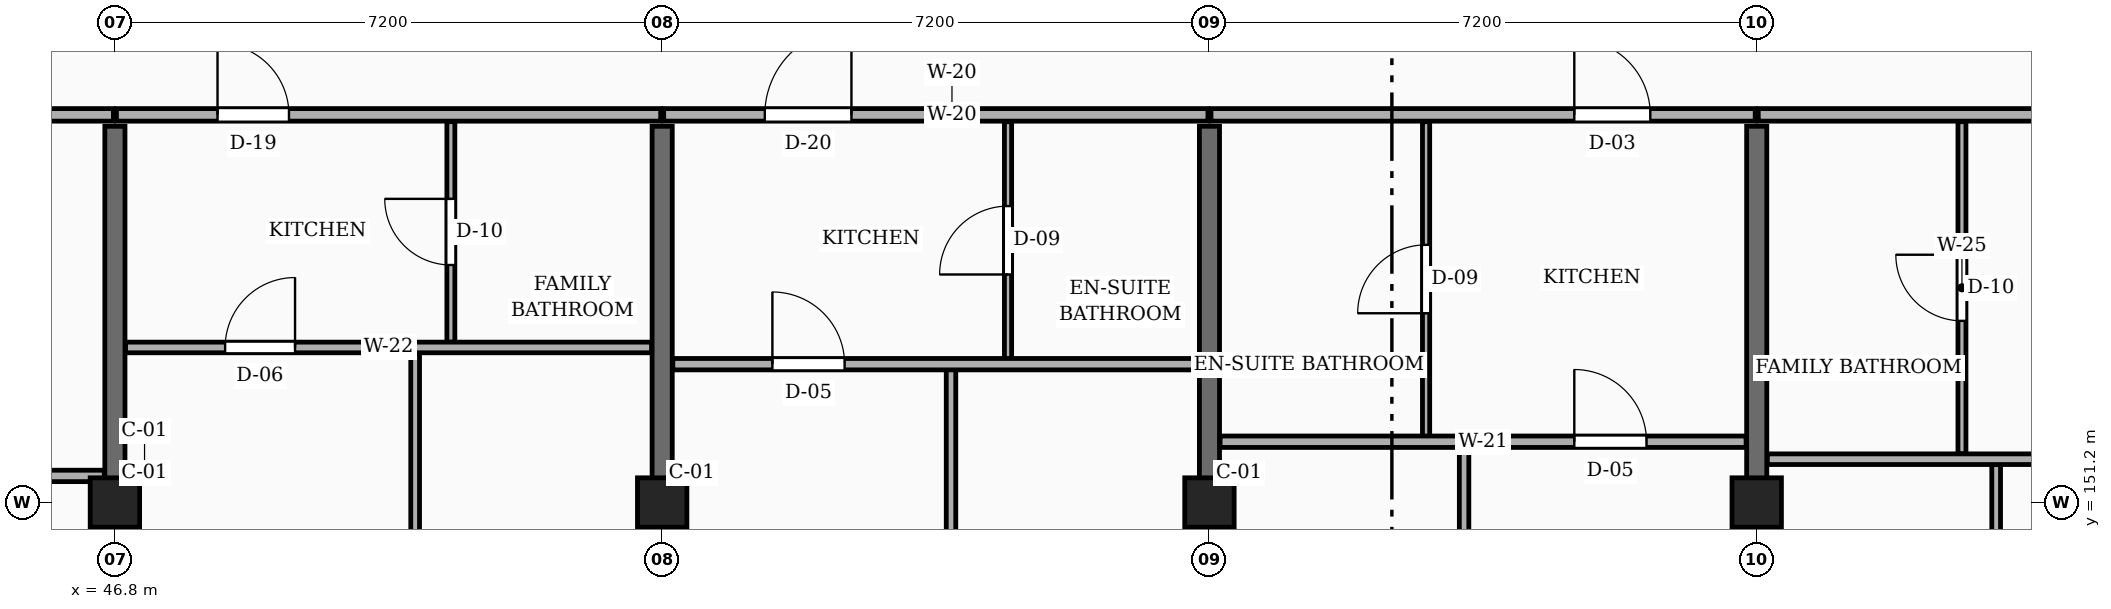
"""IFC4 building model, lengths in metres.
Left out: names, types, materials, properties, quantities, classifications, styles, units other than length and angle.
Written with IfcOpenShell. Run it as: python <this file> out.ifc"""

import sys

from ifc_helpers import new_model, si_unit, direction, frame, frame_2d, origin, origin_2d, place, context, subcontext, project, spatial, rectangle, extrude, element, fill, save


model = new_model("IFC4")
c1 = context("Model", 3, precision=1e-05, world=origin(), true_north=direction((0.0, 1.0)))
c2 = subcontext(c1, "Body", "Model", "MODEL_VIEW")
j1 = project(units=[si_unit("LENGTHUNIT", "METRE"), si_unit("PLANEANGLEUNIT", "RADIAN")], contexts=[c1])
p1 = place(None, origin())
s1 = spatial("IfcSite", under=j1, at=p1, CompositionType="ELEMENT")
p2 = place(p1, origin())
s2 = spatial("IfcBuilding", under=s1, at=p2, CompositionType="ELEMENT")
p3 = place(p2, frame((0.0, 0.0, 4.5)))
s3 = spatial("IfcBuildingStorey", under=s2, at=p3, CompositionType="ELEMENT", Elevation=4.5)
for number, where, z_axis, x_axis in (
    (1, (46.8, 151.2, 0.0), (0.0, 0.0, 1.0), (1.0, 0.0, 0.0)),
    (2, (54.0, 151.2, 0.0), (0.0, 0.0, 1.0), (1.0, 0.0, 0.0)),
    (3, (61.2, 151.2, 0.0), (0.0, 0.0, 1.0), (1.0, 0.0, 0.0)),
    (4, (68.4, 151.2, 0.0), (0.0, 0.0, 1.0), (1.0, 0.0, 0.0)),
):
    element("IfcColumn", number, at=place(p3, frame(where, z_axis=z_axis, x_axis=x_axis)), inside=s3, PredefinedType="COLUMN", context=c2, shape_type="SweptSolid", body=[
        extrude(rectangle(XDim=0.65, YDim=0.65, at=origin_2d()), origin(), (0.0, 0.0, 1.0), 3.15),
    ])
for number, where, z_axis, x_axis in (
    (5, (46.8, 144.3, 0.0), (0.0, 0.0, 1.0), (0.0, 1.0, 0.0)),
    (6, (54.0, 144.3, 0.0), (0.0, 0.0, 1.0), (0.0, 1.0, 0.0)),
    (7, (61.2, 144.3, 0.0), (0.0, 0.0, 1.0), (0.0, 1.0, 0.0)),
    (8, (68.4, 144.3, 0.0), (0.0, 0.0, 1.0), (0.0, 1.0, 0.0)),
):
    element("IfcWall", number, at=place(p3, frame(where, z_axis=z_axis, x_axis=x_axis)), inside=s3, PredefinedType="SOLIDWALL", context=c2, shape_type="SweptSolid", body=[
        extrude(rectangle(XDim=11.85, YDim=0.265, at=frame_2d((5.925, 0.0))), origin(), (0.0, 0.0, 1.0), 2.185),
    ])
p4 = place(p3, frame((39.62, 156.3, 0.0), z_axis=(0.0, 0.0, 1.0), x_axis=(1.0, 0.0, 0.0)))
e9 = element("IfcWall", 9, at=p4, inside=s3, PredefinedType="PARTITIONING", context=c2, shape_type="SweptSolid", body=[
    extrude(rectangle(XDim=7.16, YDim=0.165, at=frame_2d((3.58, 0.0))), origin(), (0.0, 0.0, 1.0), 2.32),
])
p5 = place(p4, frame((4.78, 0.0, 0.0)))
e10 = element("IfcOpeningElement", 10, at=p5, cuts=e9, PredefinedType="OPENING", context=c2, shape_type="SweptSolid", body=[
    extrude(rectangle(XDim=1.0, YDim=2.15, at=frame_2d((0.5, 1.075))), frame((0.0, 0.093, 0.0), z_axis=(0.0, -1.0, 0.0), x_axis=(1.0, 0.0, 0.0)), (0.0, 0.0, 1.0), 0.185),
])
p6 = place(p3, frame((46.82, 156.3, 0.0), z_axis=(0.0, 0.0, 1.0), x_axis=(1.0, 0.0, 0.0)))
e11 = element("IfcWall", 11, at=p6, inside=s3, PredefinedType="PARTITIONING", context=c2, shape_type="SweptSolid", body=[
    extrude(rectangle(XDim=7.16, YDim=0.165, at=frame_2d((3.58, 0.0))), origin(), (0.0, 0.0, 1.0), 2.32),
])
p7 = place(p6, frame((1.33, 0.0, 0.0)))
e12 = element("IfcOpeningElement", 12, at=p7, cuts=e11, PredefinedType="OPENING", context=c2, shape_type="SweptSolid", body=[
    extrude(rectangle(XDim=0.94, YDim=2.12, at=frame_2d((0.47, 1.06))), frame((0.0, 0.093, 0.0), z_axis=(0.0, -1.0, 0.0), x_axis=(1.0, 0.0, 0.0)), (0.0, 0.0, 1.0), 0.185),
])
p8 = place(p3, frame((54.02, 156.3, 0.0), z_axis=(0.0, 0.0, 1.0), x_axis=(1.0, 0.0, 0.0)))
e13 = element("IfcWall", 13, at=p8, inside=s3, PredefinedType="PARTITIONING", context=c2, shape_type="SweptSolid", body=[
    extrude(rectangle(XDim=7.16, YDim=0.165, at=frame_2d((3.58, 0.0))), origin(), (0.0, 0.0, 1.0), 2.32),
])
p9 = place(p8, frame((1.33, 0.0, 0.0)))
e14 = element("IfcOpeningElement", 14, at=p9, cuts=e13, PredefinedType="OPENING", context=c2, shape_type="SweptSolid", body=[
    extrude(rectangle(XDim=1.14, YDim=2.18, at=frame_2d((0.57, 1.09))), frame((0.0, 0.093, 0.0), z_axis=(0.0, -1.0, 0.0), x_axis=(1.0, 0.0, 0.0)), (0.0, 0.0, 1.0), 0.185),
])
p10 = place(p3, frame((61.22, 156.3, 0.0), z_axis=(0.0, 0.0, 1.0), x_axis=(1.0, 0.0, 0.0)))
e15 = element("IfcWall", 15, at=p10, inside=s3, PredefinedType="PARTITIONING", context=c2, shape_type="SweptSolid", body=[
    extrude(rectangle(XDim=7.16, YDim=0.165, at=frame_2d((3.58, 0.0))), origin(), (0.0, 0.0, 1.0), 2.32),
])
p11 = place(p10, frame((4.78, 0.0, 0.0)))
e16 = element("IfcOpeningElement", 16, at=p11, cuts=e15, PredefinedType="OPENING", context=c2, shape_type="SweptSolid", body=[
    extrude(rectangle(XDim=1.0, YDim=2.15, at=frame_2d((0.5, 1.075))), frame((0.0, 0.093, 0.0), z_axis=(0.0, -1.0, 0.0), x_axis=(1.0, 0.0, 0.0)), (0.0, 0.0, 1.0), 0.185),
])
p12 = place(p3, frame((68.42, 156.3, 0.0), z_axis=(0.0, 0.0, 1.0), x_axis=(1.0, 0.0, 0.0)))
e17 = element("IfcWall", 17, at=p12, inside=s3, PredefinedType="PARTITIONING", context=c2, shape_type="SweptSolid", body=[
    extrude(rectangle(XDim=7.005, YDim=0.165, at=frame_2d((3.502, 0.0))), origin(), (0.0, 0.0, 1.0), 2.32),
])
p13 = place(p12, frame((4.78, 0.0, 0.0)))
e18 = element("IfcOpeningElement", 18, at=p13, cuts=e17, PredefinedType="OPENING", context=c2, shape_type="SweptSolid", body=[
    extrude(rectangle(XDim=0.94, YDim=2.12, at=frame_2d((0.47, 1.06))), frame((0.0, 0.093, 0.0), z_axis=(0.0, -1.0, 0.0), x_axis=(1.0, 0.0, 0.0)), (0.0, 0.0, 1.0), 0.185),
])
p14 = place(p3, frame((39.74, 151.55, 0.0), z_axis=(0.0, 0.0, 1.0), x_axis=(1.0, 0.0, 0.0)))
e19 = element("IfcWall", 19, at=p14, inside=s3, PredefinedType="PARTITIONING", context=c2, shape_type="SweptSolid", body=[
    extrude(rectangle(XDim=6.92, YDim=0.15, at=frame_2d((3.46, 0.0))), origin(), (0.0, 0.0, 1.0), 2.32),
])
p15 = place(p14, frame((4.66, 0.0, 0.0)))
e20 = element("IfcOpeningElement", 20, at=p15, cuts=e19, PredefinedType="OPENING", context=c2, shape_type="SweptSolid", body=[
    extrude(rectangle(XDim=0.95, YDim=2.1, at=frame_2d((0.475, 1.05))), frame((0.0, 0.085, 0.0), z_axis=(0.0, -1.0, 0.0), x_axis=(1.0, 0.0, 0.0)), (0.0, 0.0, 1.0), 0.17),
])
p16 = place(p3, frame((50.75, 144.175, 0.0), z_axis=(0.0, 0.0, 1.0), x_axis=(0.0, 1.0, 0.0)))
e21 = element("IfcWall", 21, at=p16, inside=s3, PredefinedType="PARTITIONING", context=c2, shape_type="SweptSolid", body=[
    extrude(rectangle(XDim=8.995, YDim=0.115, at=frame_2d((4.498, 0.0))), origin(), (0.0, 0.0, 1.0), 2.32),
])
p17 = place(p16, frame((4.058, 0.0, 0.0)))
e22 = element("IfcOpeningElement", 22, at=p17, cuts=e21, PredefinedType="OPENING", context=c2, shape_type="SweptSolid", body=[
    extrude(rectangle(XDim=0.88, YDim=2.08, at=frame_2d((0.44, 1.04))), frame((0.0, 0.067, 0.0), z_axis=(0.0, -1.0, 0.0), x_axis=(1.0, 0.0, 0.0)), (0.0, 0.0, 1.0), 0.135),
])
p18 = place(p3, frame((51.22, 153.31, 0.0), z_axis=(0.0, 0.0, 1.0), x_axis=(0.0, 1.0, 0.0)))
e23 = element("IfcWall", 23, at=p18, inside=s3, PredefinedType="PARTITIONING", context=c2, shape_type="SweptSolid", body=[
    extrude(rectangle(XDim=2.9, YDim=0.105, at=frame_2d((1.45, 0.0))), origin(), (0.0, 0.0, 1.0), 2.32),
])
p19 = place(p18, frame((1.015, 0.0, 0.0)))
e24 = element("IfcOpeningElement", 24, at=p19, cuts=e23, PredefinedType="OPENING", context=c2, shape_type="SweptSolid", body=[
    extrude(rectangle(XDim=0.87, YDim=2.05, at=frame_2d((0.435, 1.025))), frame((0.0, 0.062, 0.0), z_axis=(0.0, -1.0, 0.0), x_axis=(1.0, 0.0, 0.0)), (0.0, 0.0, 1.0), 0.125),
])
p20 = place(p3, frame((46.94, 153.24, 0.0), z_axis=(0.0, 0.0, 1.0), x_axis=(1.0, 0.0, 0.0)))
e25 = element("IfcWall", 25, at=p20, inside=s3, PredefinedType="PARTITIONING", context=c2, shape_type="SweptSolid", body=[
    extrude(rectangle(XDim=6.92, YDim=0.14, at=frame_2d((3.46, 0.0))), origin(), (0.0, 0.0, 1.0), 2.32),
])
p21 = place(p20, frame((1.31, 0.0, 0.0)))
e26 = element("IfcOpeningElement", 26, at=p21, cuts=e25, PredefinedType="OPENING", context=c2, shape_type="SweptSolid", body=[
    extrude(rectangle(XDim=0.92, YDim=2.1, at=frame_2d((0.46, 1.05))), frame((0.0, 0.08, 0.0), z_axis=(0.0, -1.0, 0.0), x_axis=(1.0, 0.0, 0.0)), (0.0, 0.0, 1.0), 0.16),
])
p22 = place(p3, frame((57.8, 144.175, 0.0), z_axis=(0.0, 0.0, 1.0), x_axis=(0.0, 1.0, 0.0)))
e27 = element("IfcWall", 27, at=p22, inside=s3, PredefinedType="PARTITIONING", context=c2, shape_type="SweptSolid", body=[
    extrude(rectangle(XDim=8.775, YDim=0.125, at=frame_2d((4.387, 0.0))), origin(), (0.0, 0.0, 1.0), 2.32),
])
p23 = place(p22, frame((3.938, 0.0, 0.0)))
e28 = element("IfcOpeningElement", 28, at=p23, cuts=e27, PredefinedType="OPENING", context=c2, shape_type="SweptSolid", body=[
    extrude(rectangle(XDim=0.9, YDim=2.1, at=frame_2d((0.45, 1.05))), frame((0.0, 0.073, 0.0), z_axis=(0.0, -1.0, 0.0), x_axis=(1.0, 0.0, 0.0)), (0.0, 0.0, 1.0), 0.145),
])
p24 = place(p3, frame((58.55, 153.09, 0.0), z_axis=(0.0, 0.0, 1.0), x_axis=(0.0, 1.0, 0.0)))
e29 = element("IfcWall", 29, at=p24, inside=s3, PredefinedType="PARTITIONING", context=c2, shape_type="SweptSolid", body=[
    extrude(rectangle(XDim=3.12, YDim=0.095, at=frame_2d((1.56, 0.0))), origin(), (0.0, 0.0, 1.0), 2.32),
])
p25 = place(p24, frame((1.11, 0.0, 0.0)))
e30 = element("IfcOpeningElement", 30, at=p25, cuts=e29, PredefinedType="OPENING", context=c2, shape_type="SweptSolid", body=[
    extrude(rectangle(XDim=0.9, YDim=2.05, at=frame_2d((0.45, 1.025))), frame((0.0, 0.058, 0.0), z_axis=(0.0, -1.0, 0.0), x_axis=(1.0, 0.0, 0.0)), (0.0, 0.0, 1.0), 0.115),
])
p26 = place(p3, frame((54.14, 153.02, 0.0), z_axis=(0.0, 0.0, 1.0), x_axis=(1.0, 0.0, 0.0)))
e31 = element("IfcWall", 31, at=p26, inside=s3, PredefinedType="PARTITIONING", context=c2, shape_type="SweptSolid", body=[
    extrude(rectangle(XDim=6.92, YDim=0.15, at=frame_2d((3.46, 0.0))), origin(), (0.0, 0.0, 1.0), 2.32),
])
p27 = place(p26, frame((1.31, 0.0, 0.0)))
e32 = element("IfcOpeningElement", 32, at=p27, cuts=e31, PredefinedType="OPENING", context=c2, shape_type="SweptSolid", body=[
    extrude(rectangle(XDim=0.95, YDim=2.1, at=frame_2d((0.475, 1.05))), frame((0.0, 0.085, 0.0), z_axis=(0.0, -1.0, 0.0), x_axis=(1.0, 0.0, 0.0)), (0.0, 0.0, 1.0), 0.17),
])
p28 = place(p3, frame((64.55, 144.175, 0.0), z_axis=(0.0, 0.0, 1.0), x_axis=(0.0, 1.0, 0.0)))
e33 = element("IfcWall", 33, at=p28, inside=s3, PredefinedType="PARTITIONING", context=c2, shape_type="SweptSolid", body=[
    extrude(rectangle(XDim=7.755, YDim=0.125, at=frame_2d((3.877, 0.0))), origin(), (0.0, 0.0, 1.0), 2.32),
])
p29 = place(p28, frame((3.427, 0.0, 0.0)))
e34 = element("IfcOpeningElement", 34, at=p29, cuts=e33, PredefinedType="OPENING", context=c2, shape_type="SweptSolid", body=[
    extrude(rectangle(XDim=0.9, YDim=2.1, at=frame_2d((0.45, 1.05))), frame((0.0, 0.073, 0.0), z_axis=(0.0, -1.0, 0.0), x_axis=(1.0, 0.0, 0.0)), (0.0, 0.0, 1.0), 0.145),
])
p30 = place(p3, frame((64.05, 152.07, 0.0), z_axis=(0.0, 0.0, 1.0), x_axis=(0.0, 1.0, 0.0)))
e35 = element("IfcWall", 35, at=p30, inside=s3, PredefinedType="PARTITIONING", context=c2, shape_type="SweptSolid", body=[
    extrude(rectangle(XDim=4.14, YDim=0.095, at=frame_2d((2.07, 0.0))), origin(), (0.0, 0.0, 1.0), 2.32),
])
p31 = place(p30, frame((1.62, 0.0, 0.0)))
e36 = element("IfcOpeningElement", 36, at=p31, cuts=e35, PredefinedType="OPENING", context=c2, shape_type="SweptSolid", body=[
    extrude(rectangle(XDim=0.9, YDim=2.05, at=frame_2d((0.45, 1.025))), frame((0.0, 0.058, 0.0), z_axis=(0.0, -1.0, 0.0), x_axis=(1.0, 0.0, 0.0)), (0.0, 0.0, 1.0), 0.115),
])
p32 = place(p3, frame((61.34, 152.0, 0.0), z_axis=(0.0, 0.0, 1.0), x_axis=(1.0, 0.0, 0.0)))
e37 = element("IfcWall", 37, at=p32, inside=s3, PredefinedType="PARTITIONING", context=c2, shape_type="SweptSolid", body=[
    extrude(rectangle(XDim=6.92, YDim=0.15, at=frame_2d((3.46, 0.0))), origin(), (0.0, 0.0, 1.0), 2.32),
])
p33 = place(p32, frame((4.66, 0.0, 0.0)))
e38 = element("IfcOpeningElement", 38, at=p33, cuts=e37, PredefinedType="OPENING", context=c2, shape_type="SweptSolid", body=[
    extrude(rectangle(XDim=0.95, YDim=2.1, at=frame_2d((0.475, 1.05))), frame((0.0, 0.085, 0.0), z_axis=(0.0, -1.0, 0.0), x_axis=(1.0, 0.0, 0.0)), (0.0, 0.0, 1.0), 0.17),
])
p34 = place(p3, frame((71.55, 144.175, 0.0), z_axis=(0.0, 0.0, 1.0), x_axis=(0.0, 1.0, 0.0)))
e39 = element("IfcWall", 39, at=p34, inside=s3, PredefinedType="PARTITIONING", context=c2, shape_type="SweptSolid", body=[
    extrude(rectangle(XDim=7.525, YDim=0.115, at=frame_2d((3.762, 0.0))), origin(), (0.0, 0.0, 1.0), 2.32),
])
p35 = place(p34, frame((3.323, 0.0, 0.0)))
e40 = element("IfcOpeningElement", 40, at=p35, cuts=e39, PredefinedType="OPENING", context=c2, shape_type="SweptSolid", body=[
    extrude(rectangle(XDim=0.88, YDim=2.08, at=frame_2d((0.44, 1.04))), frame((0.0, 0.067, 0.0), z_axis=(0.0, -1.0, 0.0), x_axis=(1.0, 0.0, 0.0)), (0.0, 0.0, 1.0), 0.135),
])
p36 = place(p3, frame((71.1, 151.84, 0.0), z_axis=(0.0, 0.0, 1.0), x_axis=(0.0, 1.0, 0.0)))
e41 = element("IfcWall", 41, at=p36, inside=s3, PredefinedType="PARTITIONING", context=c2, shape_type="SweptSolid", body=[
    extrude(rectangle(XDim=4.37, YDim=0.105, at=frame_2d((2.185, 0.0))), origin(), (0.0, 0.0, 1.0), 2.32),
])
p37 = place(p36, frame((1.75, 0.0, 0.0)))
e42 = element("IfcOpeningElement", 42, at=p37, cuts=e41, PredefinedType="OPENING", context=c2, shape_type="SweptSolid", body=[
    extrude(rectangle(XDim=0.87, YDim=2.05, at=frame_2d((0.435, 1.025))), frame((0.0, 0.062, 0.0), z_axis=(0.0, -1.0, 0.0), x_axis=(1.0, 0.0, 0.0)), (0.0, 0.0, 1.0), 0.125),
])
p38 = place(p3, frame((68.54, 151.77, 0.0), z_axis=(0.0, 0.0, 1.0), x_axis=(1.0, 0.0, 0.0)))
e43 = element("IfcWall", 43, at=p38, inside=s3, PredefinedType="PARTITIONING", context=c2, shape_type="SweptSolid", body=[
    extrude(rectangle(XDim=6.885, YDim=0.14, at=frame_2d((3.442, 0.0))), origin(), (0.0, 0.0, 1.0), 2.32),
])
p39 = place(p38, frame((4.66, 0.0, 0.0)))
e44 = element("IfcOpeningElement", 44, at=p39, cuts=e43, PredefinedType="OPENING", context=c2, shape_type="SweptSolid", body=[
    extrude(rectangle(XDim=0.92, YDim=2.1, at=frame_2d((0.46, 1.05))), frame((0.0, 0.08, 0.0), z_axis=(0.0, -1.0, 0.0), x_axis=(1.0, 0.0, 0.0)), (0.0, 0.0, 1.0), 0.16),
])
p40 = place(p7, origin())
e45 = element("IfcDoor", 45, at=p40, inside=s3, OperationType="SINGLE_SWING_LEFT", PredefinedType="DOOR", context=c2, shape_type="SweptSolid", body=[
    extrude(rectangle(XDim=0.94, YDim=2.12, at=frame_2d((0.47, 1.06))), frame((0.0, 0.025, 0.0), z_axis=(0.0, -1.0, 0.0), x_axis=(1.0, 0.0, 0.0)), (0.0, 0.0, 1.0), 0.05),
])
fill(e12, e45)
p41 = place(p9, origin())
e46 = element("IfcDoor", 46, at=p41, inside=s3, OperationType="SINGLE_SWING_RIGHT", PredefinedType="DOOR", context=c2, shape_type="SweptSolid", body=[
    extrude(rectangle(XDim=1.14, YDim=2.18, at=frame_2d((0.57, 1.09))), frame((0.0, 0.025, 0.0), z_axis=(0.0, -1.0, 0.0), x_axis=(1.0, 0.0, 0.0)), (0.0, 0.0, 1.0), 0.05),
])
fill(e14, e46)
p42 = place(p11, origin())
e47 = element("IfcDoor", 47, at=p42, inside=s3, OperationType="SINGLE_SWING_LEFT", PredefinedType="DOOR", context=c2, shape_type="SweptSolid", body=[
    extrude(rectangle(XDim=1.0, YDim=2.15, at=frame_2d((0.5, 1.075))), frame((0.0, 0.025, 0.0), z_axis=(0.0, -1.0, 0.0), x_axis=(1.0, 0.0, 0.0)), (0.0, 0.0, 1.0), 0.05),
])
fill(e16, e47)
p43 = place(p19, origin())
e48 = element("IfcDoor", 48, at=p43, inside=s3, OperationType="SINGLE_SWING_RIGHT", PredefinedType="DOOR", context=c2, shape_type="SweptSolid", body=[
    extrude(rectangle(XDim=0.87, YDim=2.05, at=frame_2d((0.435, 1.025))), frame((0.0, 0.025, 0.0), z_axis=(0.0, -1.0, 0.0), x_axis=(1.0, 0.0, 0.0)), (0.0, 0.0, 1.0), 0.05),
])
fill(e24, e48)
p44 = place(p21, origin())
e49 = element("IfcDoor", 49, at=p44, inside=s3, OperationType="SINGLE_SWING_RIGHT", PredefinedType="DOOR", context=c2, shape_type="SweptSolid", body=[
    extrude(rectangle(XDim=0.92, YDim=2.1, at=frame_2d((0.46, 1.05))), frame((0.0, 0.025, 0.0), z_axis=(0.0, -1.0, 0.0), x_axis=(1.0, 0.0, 0.0)), (0.0, 0.0, 1.0), 0.05),
])
fill(e26, e49)
p45 = place(p25, origin())
e50 = element("IfcDoor", 50, at=p45, inside=s3, OperationType="SINGLE_SWING_LEFT", PredefinedType="DOOR", context=c2, shape_type="SweptSolid", body=[
    extrude(rectangle(XDim=0.9, YDim=2.05, at=frame_2d((0.45, 1.025))), frame((0.0, 0.025, 0.0), z_axis=(0.0, -1.0, 0.0), x_axis=(1.0, 0.0, 0.0)), (0.0, 0.0, 1.0), 0.05),
])
fill(e30, e50)
p46 = place(p27, origin())
e51 = element("IfcDoor", 51, at=p46, inside=s3, OperationType="SINGLE_SWING_LEFT", PredefinedType="DOOR", context=c2, shape_type="SweptSolid", body=[
    extrude(rectangle(XDim=0.95, YDim=2.1, at=frame_2d((0.475, 1.05))), frame((0.0, 0.025, 0.0), z_axis=(0.0, -1.0, 0.0), x_axis=(1.0, 0.0, 0.0)), (0.0, 0.0, 1.0), 0.05),
])
fill(e32, e51)
p47 = place(p31, origin())
e52 = element("IfcDoor", 52, at=p47, inside=s3, OperationType="SINGLE_SWING_LEFT", PredefinedType="DOOR", context=c2, shape_type="SweptSolid", body=[
    extrude(rectangle(XDim=0.9, YDim=2.05, at=frame_2d((0.45, 1.025))), frame((0.0, 0.025, 0.0), z_axis=(0.0, -1.0, 0.0), x_axis=(1.0, 0.0, 0.0)), (0.0, 0.0, 1.0), 0.05),
])
fill(e36, e52)
p48 = place(p33, origin())
e53 = element("IfcDoor", 53, at=p48, inside=s3, OperationType="SINGLE_SWING_LEFT", PredefinedType="DOOR", context=c2, shape_type="SweptSolid", body=[
    extrude(rectangle(XDim=0.95, YDim=2.1, at=frame_2d((0.475, 1.05))), frame((0.0, 0.025, 0.0), z_axis=(0.0, -1.0, 0.0), x_axis=(1.0, 0.0, 0.0)), (0.0, 0.0, 1.0), 0.05),
])
fill(e38, e53)
p49 = place(p37, origin())
e54 = element("IfcDoor", 54, at=p49, inside=s3, OperationType="SINGLE_SWING_RIGHT", PredefinedType="DOOR", context=c2, shape_type="SweptSolid", body=[
    extrude(rectangle(XDim=0.87, YDim=2.05, at=frame_2d((0.435, 1.025))), frame((0.0, 0.025, 0.0), z_axis=(0.0, -1.0, 0.0), x_axis=(1.0, 0.0, 0.0)), (0.0, 0.0, 1.0), 0.05),
])
fill(e42, e54)
save(model, sys.argv[1])
